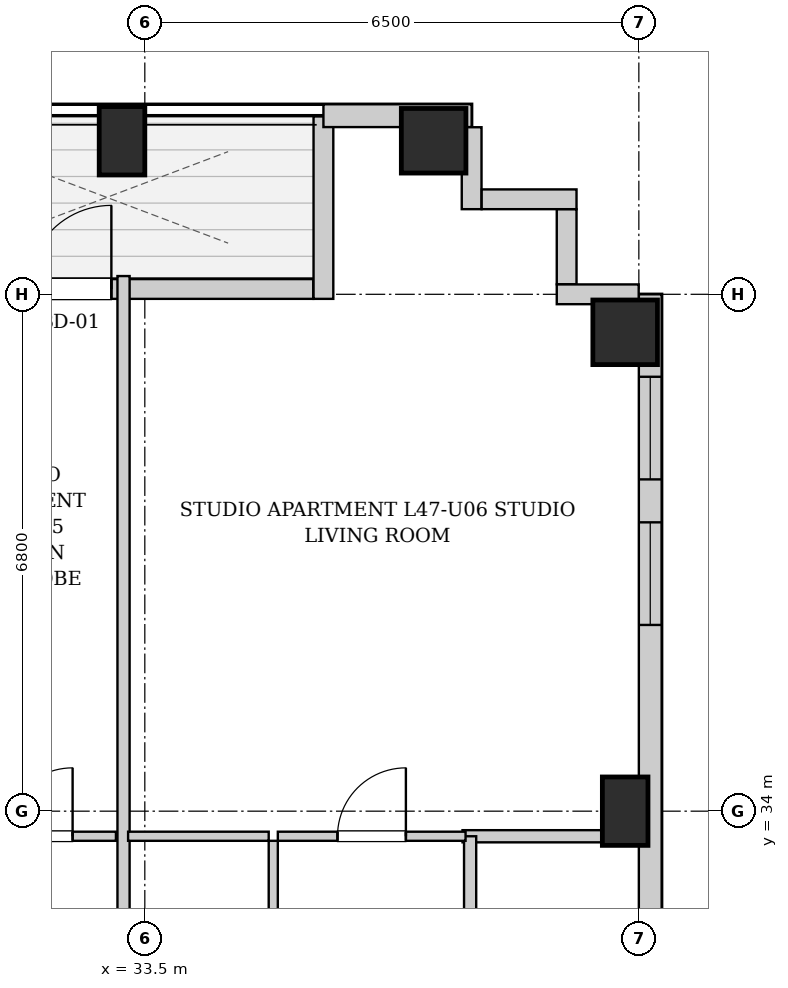
"""IFC4 building model, lengths in metres.
Left out: names, types, materials, properties, quantities, classifications, styles, units other than length and angle.
Written with IfcOpenShell. Run it as: python <this file> out.ifc"""

import sys

from ifc_helpers import new_model, si_unit, direction, frame, frame_2d, origin, origin_2d, place, context, subcontext, project, spatial, rectangle, extrude, element, fill, save


model = new_model("IFC4")
c1 = context("Model", 3, precision=1e-05, world=origin(), true_north=direction((0.0, 1.0)))
c2 = subcontext(c1, "Body", "Model", "MODEL_VIEW")
j1 = project(units=[si_unit("LENGTHUNIT", "METRE"), si_unit("PLANEANGLEUNIT", "RADIAN")], contexts=[c1])
p1 = place(None, origin())
s1 = spatial("IfcSite", under=j1, at=p1, CompositionType="ELEMENT")
p2 = place(p1, origin())
s2 = spatial("IfcBuilding", under=s1, at=p2, CompositionType="ELEMENT")
p3 = place(p2, frame((0.0, 0.0, 163.4)))
s3 = spatial("IfcBuildingStorey", under=s2, at=p3, CompositionType="ELEMENT", Elevation=163.4)
p4 = place(p3, frame((33.2, 42.82, 0.0), z_axis=(0.0, 0.0, 1.0), x_axis=(1.0, 0.0, 0.0)))
e1 = element("IfcColumn", 1, at=p4, inside=s3, PredefinedType="COLUMN", context=c2, shape_type="SweptSolid", body=[
    extrude(rectangle(XDim=0.6, YDim=0.9, at=origin_2d()), origin(), (0.0, 0.0, 1.0), 3.25),
])
p5 = place(p3, frame((37.3, 42.82, 0.0), z_axis=(0.0, 0.0, 1.0), x_axis=(1.0, 0.0, 0.0)))
e2 = element("IfcColumn", 2, at=p5, inside=s3, PredefinedType="COLUMN", context=c2, shape_type="SweptSolid", body=[
    extrude(rectangle(XDim=0.85, YDim=0.85, at=origin_2d()), origin(), (0.0, 0.0, 1.0), 3.25),
])
p6 = place(p3, frame((39.82, 34.0, 0.0), z_axis=(0.0, 0.0, 1.0), x_axis=(1.0, 0.0, 0.0)))
e3 = element("IfcColumn", 3, at=p6, inside=s3, PredefinedType="COLUMN", context=c2, shape_type="SweptSolid", body=[
    extrude(rectangle(XDim=0.6, YDim=0.9, at=origin_2d()), origin(), (0.0, 0.0, 1.0), 3.25),
])
p7 = place(p3, frame((39.82, 40.3, 0.0), z_axis=(0.0, 0.0, 1.0), x_axis=(1.0, 0.0, 0.0)))
e4 = element("IfcColumn", 4, at=p7, inside=s3, PredefinedType="COLUMN", context=c2, shape_type="SweptSolid", body=[
    extrude(rectangle(XDim=0.85, YDim=0.85, at=origin_2d()), origin(), (0.0, 0.0, 1.0), 3.25),
])
p8 = place(p3, frame((30.284, 40.87, 0.0), z_axis=(0.0, 0.0, 1.0), x_axis=(1.0, 0.0, 0.0)))
e5 = element("IfcWall", 5, at=p8, inside=s3, PredefinedType="SOLIDWALL", context=c2, shape_type="SweptSolid", body=[
    extrude(rectangle(XDim=5.432, YDim=0.26, at=frame_2d((2.716, 0.0))), origin(), (0.0, 0.0, 1.0), 2.99),
])
p9 = place(p8, frame((1.676, 0.0, 0.0)))
e6 = element("IfcOpeningElement", 6, at=p9, cuts=e5, PredefinedType="OPENING", context=c2, shape_type="SweptSolid", body=[
    extrude(rectangle(XDim=1.1, YDim=2.0, at=frame_2d((0.55, 1.0))), frame((0.0, 0.14, 0.0), z_axis=(0.0, -1.0, 0.0), x_axis=(1.0, 0.0, 0.0)), (0.0, 0.0, 1.0), 0.28),
])
p10 = place(p8, frame((0.666, 0.0, 0.55)))
e7 = element("IfcOpeningElement", 7, at=p10, cuts=e5, PredefinedType="OPENING", context=c2, shape_type="SweptSolid", body=[
    extrude(rectangle(XDim=0.85, YDim=1.2, at=frame_2d((0.425, 0.6))), frame((0.0, 0.14, 0.0), z_axis=(0.0, -1.0, 0.0), x_axis=(1.0, 0.0, 0.0)), (0.0, 0.0, 1.0), 0.28),
])
p11 = place(p3, frame((35.85, 40.74, 0.0), z_axis=(0.0, 0.0, 1.0), x_axis=(0.0, 1.0, 0.0)))
e8 = element("IfcWall", 8, at=p11, inside=s3, PredefinedType="SOLIDWALL", context=c2, shape_type="SweptSolid", body=[
    extrude(rectangle(XDim=2.4, YDim=0.26, at=frame_2d((1.2, 0.0))), origin(), (0.0, 0.0, 1.0), 2.99),
])
p12 = place(p3, frame((35.85, 43.15, 0.0), z_axis=(0.0, 0.0, 1.0), x_axis=(1.0, 0.0, 0.0)))
e9 = element("IfcWall", 9, at=p12, inside=s3, PredefinedType="SOLIDWALL", context=c2, shape_type="SweptSolid", body=[
    extrude(rectangle(XDim=1.95, YDim=0.3, at=frame_2d((0.975, 0.0))), origin(), (0.0, 0.0, 1.0), 2.99),
])
p13 = place(p3, frame((40.15, 40.8, 0.0), z_axis=(0.0, 0.0, 1.0), x_axis=(0.0, -1.0, 0.0)))
e10 = element("IfcWall", 10, at=p13, inside=s3, PredefinedType="SOLIDWALL", context=c2, shape_type="SweptSolid", body=[
    extrude(rectangle(XDim=34.5, YDim=0.3, at=frame_2d((17.25, 0.0))), origin(), (0.0, 0.0, 1.0), 2.99),
])
p14 = place(p13, frame((31.725, 0.0, 0.55)))
e11 = element("IfcOpeningElement", 11, at=p14, cuts=e10, PredefinedType="OPENING", context=c2, shape_type="SweptSolid", body=[
    extrude(rectangle(XDim=1.35, YDim=1.2, at=frame_2d((0.675, 0.6))), frame((0.0, 0.16, 0.0), z_axis=(0.0, -1.0, 0.0), x_axis=(1.0, 0.0, 0.0)), (0.0, 0.0, 1.0), 0.32),
])
p15 = place(p13, frame((3.0, 0.0, 0.55)))
e12 = element("IfcOpeningElement", 12, at=p15, cuts=e10, PredefinedType="OPENING", context=c2, shape_type="SweptSolid", body=[
    extrude(rectangle(XDim=1.35, YDim=1.2, at=frame_2d((0.675, 0.6))), frame((0.0, 0.16, 0.0), z_axis=(0.0, -1.0, 0.0), x_axis=(1.0, 0.0, 0.0)), (0.0, 0.0, 1.0), 0.32),
])
p16 = place(p13, frame((1.085, 0.0, 0.55)))
e13 = element("IfcOpeningElement", 13, at=p16, cuts=e10, PredefinedType="OPENING", context=c2, shape_type="SweptSolid", body=[
    extrude(rectangle(XDim=1.35, YDim=1.2, at=frame_2d((0.675, 0.6))), frame((0.0, 0.16, 0.0), z_axis=(0.0, -1.0, 0.0), x_axis=(1.0, 0.0, 0.0)), (0.0, 0.0, 1.0), 0.32),
])
p17 = place(p13, frame((21.3, 0.0, 0.55)))
e14 = element("IfcOpeningElement", 14, at=p17, cuts=e10, PredefinedType="OPENING", context=c2, shape_type="SweptSolid", body=[
    extrude(rectangle(XDim=1.35, YDim=1.2, at=frame_2d((0.675, 0.6))), frame((0.0, 0.16, 0.0), z_axis=(0.0, -1.0, 0.0), x_axis=(1.0, 0.0, 0.0)), (0.0, 0.0, 1.0), 0.32),
])
p18 = place(p13, frame((22.91, 0.0, 0.55)))
e15 = element("IfcOpeningElement", 15, at=p18, cuts=e10, PredefinedType="OPENING", context=c2, shape_type="SweptSolid", body=[
    extrude(rectangle(XDim=1.35, YDim=1.2, at=frame_2d((0.675, 0.6))), frame((0.0, 0.16, 0.0), z_axis=(0.0, -1.0, 0.0), x_axis=(1.0, 0.0, 0.0)), (0.0, 0.0, 1.0), 0.32),
])
p19 = place(p13, frame((14.175, 0.0, 0.55)))
e16 = element("IfcOpeningElement", 16, at=p19, cuts=e10, PredefinedType="OPENING", context=c2, shape_type="SweptSolid", body=[
    extrude(rectangle(XDim=1.35, YDim=1.2, at=frame_2d((0.675, 0.6))), frame((0.0, 0.16, 0.0), z_axis=(0.0, -1.0, 0.0), x_axis=(1.0, 0.0, 0.0)), (0.0, 0.0, 1.0), 0.32),
])
p20 = place(p13, frame((12.41, 0.0, 0.55)))
e17 = element("IfcOpeningElement", 17, at=p20, cuts=e10, PredefinedType="OPENING", context=c2, shape_type="SweptSolid", body=[
    extrude(rectangle(XDim=1.35, YDim=1.2, at=frame_2d((0.675, 0.6))), frame((0.0, 0.16, 0.0), z_axis=(0.0, -1.0, 0.0), x_axis=(1.0, 0.0, 0.0)), (0.0, 0.0, 1.0), 0.32),
])
p21 = place(p3, frame((37.8, 42.998, 0.0), z_axis=(0.0, 0.0, 1.0), x_axis=(0.0, -1.0, 0.0)))
e18 = element("IfcWall", 18, at=p21, inside=s3, PredefinedType="SOLIDWALL", context=c2, shape_type="SweptSolid", body=[
    extrude(rectangle(XDim=1.078, YDim=0.26, at=frame_2d((0.539, 0.0))), origin(), (0.0, 0.0, 1.0), 2.99),
])
p22 = place(p3, frame((37.932, 42.05, 0.0), z_axis=(0.0, 0.0, 1.0), x_axis=(1.0, 0.0, 0.0)))
e19 = element("IfcWall", 19, at=p22, inside=s3, PredefinedType="SOLIDWALL", context=c2, shape_type="SweptSolid", body=[
    extrude(rectangle(XDim=1.248, YDim=0.26, at=frame_2d((0.624, 0.0))), origin(), (0.0, 0.0, 1.0), 2.99),
])
p23 = place(p3, frame((39.05, 41.918, 0.0), z_axis=(0.0, 0.0, 1.0), x_axis=(0.0, -1.0, 0.0)))
e20 = element("IfcWall", 20, at=p23, inside=s3, PredefinedType="SOLIDWALL", context=c2, shape_type="SweptSolid", body=[
    extrude(rectangle(XDim=0.986, YDim=0.26, at=frame_2d((0.493, 0.0))), origin(), (0.0, 0.0, 1.0), 2.99),
])
p24 = place(p3, frame((38.92, 40.8, 0.0), z_axis=(0.0, 0.0, 1.0), x_axis=(1.0, 0.0, 0.0)))
e21 = element("IfcWall", 21, at=p24, inside=s3, PredefinedType="SOLIDWALL", context=c2, shape_type="SweptSolid", body=[
    extrude(rectangle(XDim=1.078, YDim=0.26, at=frame_2d((0.539, 0.0))), origin(), (0.0, 0.0, 1.0), 2.99),
])
p25 = place(p3, frame((31.081, 33.67, 0.0), z_axis=(0.0, 0.0, 1.0), x_axis=(1.0, 0.0, 0.0)))
e22 = element("IfcWall", 22, at=p25, inside=s3, PredefinedType="PARTITIONING", context=c2, shape_type="SweptSolid", body=[
    extrude(rectangle(XDim=2.039, YDim=0.12, at=frame_2d((1.02, 0.0))), origin(), (0.0, 0.0, 1.0), 2.99),
])
p26 = place(p25, frame((0.569, 0.0, 0.0)))
e23 = element("IfcOpeningElement", 23, at=p26, cuts=e22, PredefinedType="OPENING", context=c2, shape_type="SweptSolid", body=[
    extrude(rectangle(XDim=0.9, YDim=2.05, at=frame_2d((0.45, 1.025))), frame((0.0, 0.07, 0.0), z_axis=(0.0, -1.0, 0.0), x_axis=(1.0, 0.0, 0.0)), (0.0, 0.0, 1.0), 0.14),
])
p27 = place(p3, frame((37.68, 33.67, 0.0), z_axis=(0.0, 0.0, 1.0), x_axis=(1.0, 0.0, 0.0)))
e24 = element("IfcWall", 24, at=p27, inside=s3, PredefinedType="PARTITIONING", context=c2, shape_type="SweptSolid", body=[
    extrude(rectangle(XDim=2.34, YDim=0.16, at=frame_2d((1.17, 0.0))), origin(), (0.0, 0.0, 1.0), 2.99),
])
p28 = place(p3, frame((37.78, 30.76, 0.0), z_axis=(0.0, 0.0, 1.0), x_axis=(0.0, 1.0, 0.0)))
e25 = element("IfcWall", 25, at=p28, inside=s3, PredefinedType="PARTITIONING", context=c2, shape_type="SweptSolid", body=[
    extrude(rectangle(XDim=2.91, YDim=0.16, at=frame_2d((1.455, 0.0))), origin(), (0.0, 0.0, 1.0), 2.99),
])
p29 = place(p3, frame((33.22, 30.76, 0.0), z_axis=(0.0, 0.0, 1.0), x_axis=(0.0, 1.0, 0.0)))
e26 = element("IfcWall", 26, at=p29, inside=s3, PredefinedType="PARTITIONING", context=c2, shape_type="SweptSolid", body=[
    extrude(rectangle(XDim=10.28, YDim=0.16, at=frame_2d((5.14, 0.0))), origin(), (0.0, 0.0, 1.0), 2.442),
])
p30 = place(p3, frame((35.19, 30.76, 0.0), z_axis=(0.0, 0.0, 1.0), x_axis=(0.0, 1.0, 0.0)))
e27 = element("IfcWall", 27, at=p30, inside=s3, PredefinedType="PARTITIONING", context=c2, shape_type="SweptSolid", body=[
    extrude(rectangle(XDim=2.85, YDim=0.12, at=frame_2d((1.425, 0.0))), origin(), (0.0, 0.0, 1.0), 2.99),
])
p31 = place(p30, frame((0.995, 0.0, 0.0)))
e28 = element("IfcOpeningElement", 28, at=p31, cuts=e27, PredefinedType="OPENING", context=c2, shape_type="SweptSolid", body=[
    extrude(rectangle(XDim=0.86, YDim=2.05, at=frame_2d((0.43, 1.025))), frame((0.0, 0.07, 0.0), z_axis=(0.0, -1.0, 0.0), x_axis=(1.0, 0.0, 0.0)), (0.0, 0.0, 1.0), 0.14),
])
p32 = place(p3, frame((33.28, 33.67, 0.0), z_axis=(0.0, 0.0, 1.0), x_axis=(1.0, 0.0, 0.0)))
e29 = element("IfcWall", 29, at=p32, inside=s3, PredefinedType="PARTITIONING", context=c2, shape_type="SweptSolid", body=[
    extrude(rectangle(XDim=1.85, YDim=0.12, at=frame_2d((0.925, 0.0))), origin(), (0.0, 0.0, 1.0), 2.99),
])
p33 = place(p3, frame((35.25, 33.67, 0.0), z_axis=(0.0, 0.0, 1.0), x_axis=(1.0, 0.0, 0.0)))
e30 = element("IfcWall", 30, at=p33, inside=s3, PredefinedType="PARTITIONING", context=c2, shape_type="SweptSolid", body=[
    extrude(rectangle(XDim=2.47, YDim=0.12, at=frame_2d((1.235, 0.0))), origin(), (0.0, 0.0, 1.0), 2.99),
])
p34 = place(p33, frame((0.785, 0.0, 0.0)))
e31 = element("IfcOpeningElement", 31, at=p34, cuts=e30, PredefinedType="OPENING", context=c2, shape_type="SweptSolid", body=[
    extrude(rectangle(XDim=0.9, YDim=2.05, at=frame_2d((0.45, 1.025))), frame((0.0, 0.07, 0.0), z_axis=(0.0, -1.0, 0.0), x_axis=(1.0, 0.0, 0.0)), (0.0, 0.0, 1.0), 0.14),
])
p35 = place(p26, origin())
e32 = element("IfcDoor", 32, at=p35, inside=s3, OperationType="SINGLE_SWING_RIGHT", PredefinedType="DOOR", context=c2, shape_type="SweptSolid", body=[
    extrude(rectangle(XDim=0.9, YDim=2.05, at=frame_2d((0.45, 1.025))), frame((0.0, 0.025, 0.0), z_axis=(0.0, -1.0, 0.0), x_axis=(1.0, 0.0, 0.0)), (0.0, 0.0, 1.0), 0.05),
])
fill(e23, e32)
p36 = place(p34, origin())
e33 = element("IfcDoor", 33, at=p36, inside=s3, OperationType="SINGLE_SWING_RIGHT", PredefinedType="DOOR", context=c2, shape_type="SweptSolid", body=[
    extrude(rectangle(XDim=0.9, YDim=2.05, at=frame_2d((0.45, 1.025))), frame((0.0, 0.025, 0.0), z_axis=(0.0, -1.0, 0.0), x_axis=(1.0, 0.0, 0.0)), (0.0, 0.0, 1.0), 0.05),
])
fill(e31, e33)
p37 = place(p9, origin())
e34 = element("IfcDoor", 34, at=p37, inside=s3, OperationType="SINGLE_SWING_RIGHT", PredefinedType="DOOR", context=c2, shape_type="SweptSolid", body=[
    extrude(rectangle(XDim=1.1, YDim=2.0, at=frame_2d((0.55, 1.0))), frame((0.0, 0.025, 0.0), z_axis=(0.0, -1.0, 0.0), x_axis=(1.0, 0.0, 0.0)), (0.0, 0.0, 1.0), 0.05),
])
fill(e6, e34)
p38 = place(p15, origin())
e35 = element("IfcWindow", 35, at=p38, inside=s3, PartitioningType="SINGLE_PANEL", PredefinedType="WINDOW", context=c2, shape_type="SweptSolid", body=[
    extrude(rectangle(XDim=1.35, YDim=1.2, at=frame_2d((0.675, 0.6))), frame((0.0, 0.03, 0.0), z_axis=(0.0, -1.0, 0.0), x_axis=(1.0, 0.0, 0.0)), (0.0, 0.0, 1.0), 0.06),
])
fill(e12, e35)
p39 = place(p16, origin())
e36 = element("IfcWindow", 36, at=p39, inside=s3, PartitioningType="SINGLE_PANEL", PredefinedType="WINDOW", context=c2, shape_type="SweptSolid", body=[
    extrude(rectangle(XDim=1.35, YDim=1.2, at=frame_2d((0.675, 0.6))), frame((0.0, 0.03, 0.0), z_axis=(0.0, -1.0, 0.0), x_axis=(1.0, 0.0, 0.0)), (0.0, 0.0, 1.0), 0.06),
])
fill(e13, e36)
save(model, sys.argv[1])
